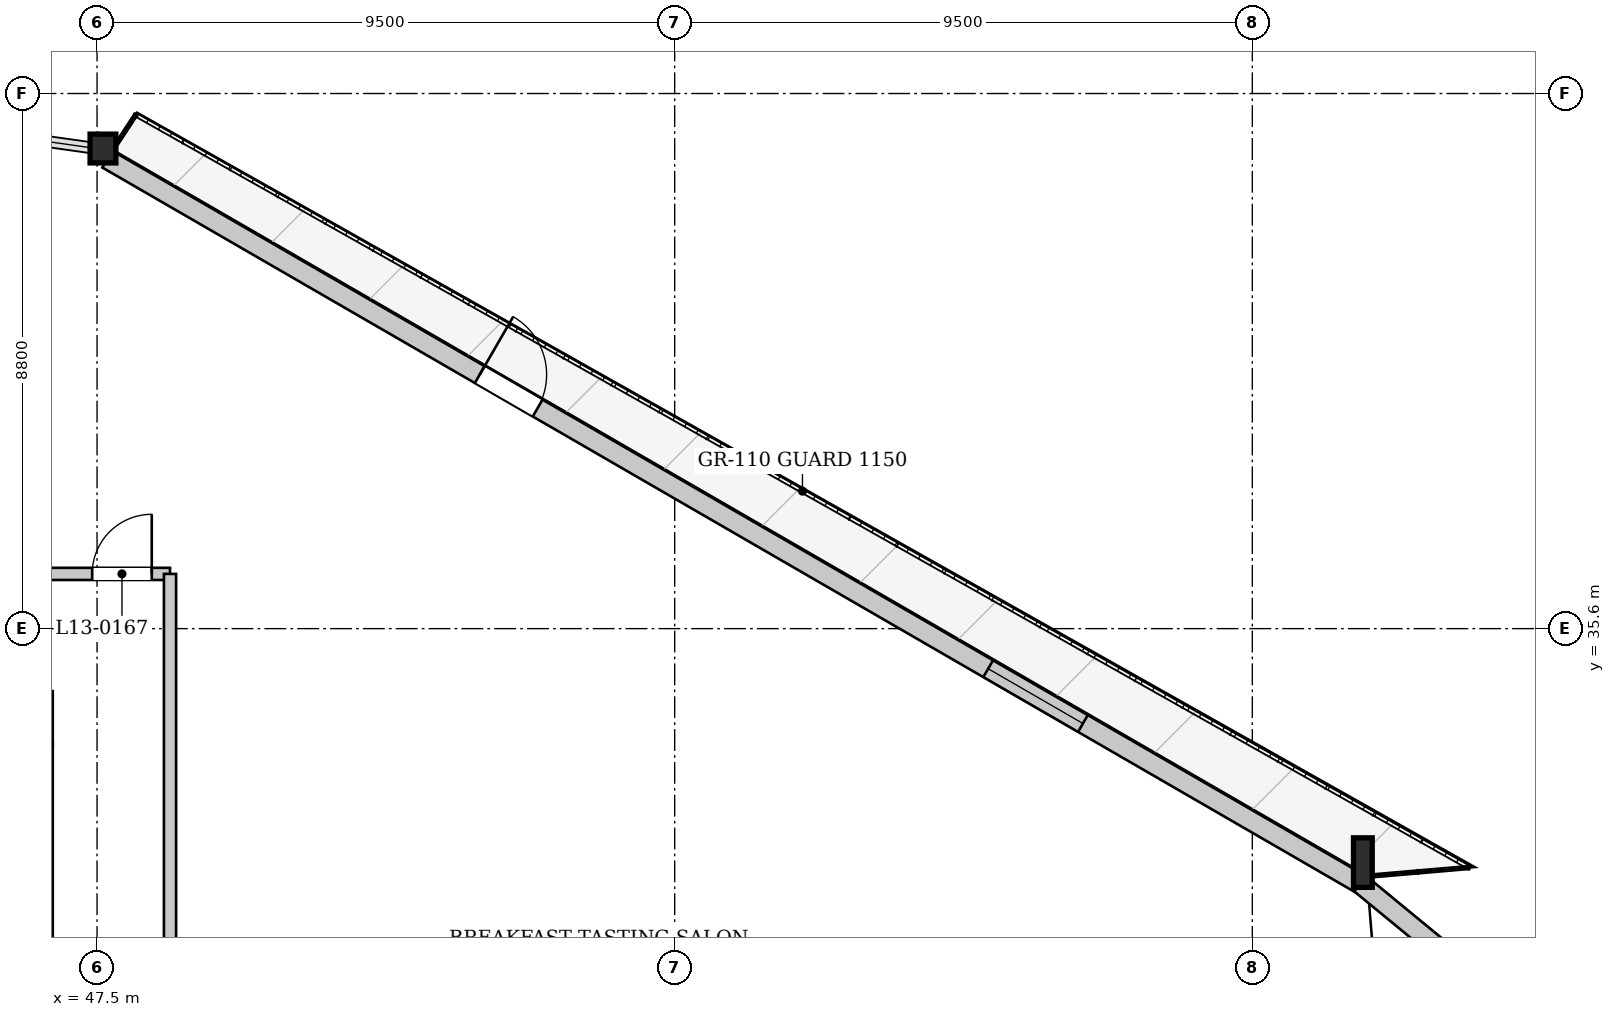
"""IFC4 building model, lengths in metres.
Left out: names, types, materials, properties, quantities, classifications, styles, units other than length and angle.
Written with IfcOpenShell. Run it as: python <this file> out.ifc"""

import sys

from ifc_helpers import new_model, si_unit, direction, frame, frame_2d, origin, origin_2d, place, context, subcontext, project, spatial, rectangle, i_section, extrude, source, transform, mapped, element, fill, save


model = new_model("IFC4")
c1 = context("Model", 3, precision=1e-05, world=origin(), true_north=direction((0.0, 1.0)))
c2 = subcontext(c1, "Body", "Model", "MODEL_VIEW")
j1 = project(units=[si_unit("LENGTHUNIT", "METRE"), si_unit("PLANEANGLEUNIT", "RADIAN")], contexts=[c1])
p1 = place(None, origin())
s1 = spatial("IfcSite", under=j1, at=p1, CompositionType="ELEMENT")
p2 = place(p1, origin())
s2 = spatial("IfcBuilding", under=s1, at=p2, CompositionType="ELEMENT")
p3 = place(p2, frame((0.0, 0.0, 54.15)))
s3 = spatial("IfcBuildingStorey", under=s2, at=p3, CompositionType="ELEMENT", Elevation=54.15)
m1 = source(origin(), c2, "Body", "SweptSolid", [
    extrude(i_section(OverallWidth=0.308, OverallDepth=0.814, WebThickness=0.021, FlangeThickness=0.04, at=origin_2d()), origin(), (0.0, 0.0, 1.0), 3.417),
])
p4 = place(p3, frame((68.38, 31.526, 0.0), z_axis=(-0.036077478038, 0.132522221309, 0.990523233669), x_axis=(-0.964883756144, -0.262677248977, 0.0)))
e1 = element("IfcColumn", 1, at=p4, inside=s3, PredefinedType="COLUMN", context=c2, shape_type="MappedRepresentation", body=[
    mapped(m1, transform((0.0, 0.0, 0.0), x_axis=(1.0, 0.0, 0.0), y_axis=(0.0, 1.0, 0.0), z_axis=(0.0, 0.0, 1.0), scale=1.0)),
])
m2 = source(origin(), c2, "Body", "SweptSolid", [
    extrude(i_section(OverallWidth=0.424, OverallDepth=0.474, WebThickness=0.043, FlangeThickness=0.068, at=origin_2d()), origin(), (0.0, 0.0, 1.0), 3.399),
])
p5 = place(p3, frame((47.748, 43.459, 0.0), z_axis=(-0.088630763536, 0.021188067458, 0.995839170525), x_axis=(-0.232508383837, -0.972594392049, 0.0)))
e2 = element("IfcColumn", 2, at=p5, inside=s3, PredefinedType="COLUMN", context=c2, shape_type="MappedRepresentation", body=[
    mapped(m2, transform((0.0, 0.0, 0.0), x_axis=(1.0, 0.0, 0.0), y_axis=(0.0, 1.0, 0.0), z_axis=(0.0, 0.0, 1.0), scale=1.0)),
])
p6 = place(p3, frame((47.668, 43.321, 0.0), z_axis=(0.0, 0.0, 1.0), x_axis=(0.865638001519, -0.500670400888, 0.0)))
e3 = element("IfcWall", 3, at=p6, inside=s3, PredefinedType="SOLIDWALL", context=c2, shape_type="SweptSolid", body=[
    extrude(rectangle(XDim=23.834, YDim=0.32, at=frame_2d((11.917, 0.0))), origin(), (0.0, 0.0, 1.0), 2.592),
])
p7 = place(p6, frame((7.077, 0.0, 0.0)))
e4 = element("IfcOpeningElement", 4, at=p7, cuts=e3, PredefinedType="OPENING", context=c2, shape_type="SweptSolid", body=[
    extrude(rectangle(XDim=1.1, YDim=2.3, at=frame_2d((0.55, 1.15))), frame((0.0, 0.17, 0.0), z_axis=(0.0, -1.0, 0.0), x_axis=(1.0, 0.0, 0.0)), (0.0, 0.0, 1.0), 0.34),
])
p8 = place(p6, frame((16.737, 0.0, 0.272)))
e5 = element("IfcOpeningElement", 5, at=p8, cuts=e3, PredefinedType="OPENING", context=c2, shape_type="SweptSolid", body=[
    extrude(rectangle(XDim=1.8, YDim=2.2, at=frame_2d((0.9, 1.1))), frame((0.0, 0.17, 0.0), z_axis=(0.0, -1.0, 0.0), x_axis=(1.0, 0.0, 0.0)), (0.0, 0.0, 1.0), 0.34),
])
p9 = place(p3, frame((68.278, 31.403, 0.0), z_axis=(0.0, 0.0, 1.0), x_axis=(0.772169227006, -0.635416937817, 0.0)))
e6 = element("IfcWall", 6, at=p9, inside=s3, PredefinedType="SOLIDWALL", context=c2, shape_type="SweptSolid", body=[
    extrude(rectangle(XDim=3.272, YDim=0.32, at=frame_2d((1.636, 0.0))), origin(), (0.0, 0.0, 1.0), 2.592),
])
p10 = place(p3, frame((27.3, 36.5, 0.0), z_axis=(0.0, 0.0, 1.0), x_axis=(1.0, 0.0, 0.0)))
e7 = element("IfcWall", 7, at=p10, inside=s3, PredefinedType="PARTITIONING", context=c2, shape_type="SweptSolid", body=[
    extrude(rectangle(XDim=21.4, YDim=0.2, at=frame_2d((10.7, 0.0))), origin(), (0.0, 0.0, 1.0), 3.3),
])
p11 = place(p10, frame((20.12, 0.0, 0.0)))
e8 = element("IfcOpeningElement", 8, at=p11, cuts=e7, PredefinedType="OPENING", context=c2, shape_type="SweptSolid", body=[
    extrude(rectangle(XDim=0.98, YDim=2.15, at=frame_2d((0.49, 1.075))), frame((0.0, 0.11, 0.0), z_axis=(0.0, -1.0, 0.0), x_axis=(1.0, 0.0, 0.0)), (0.0, 0.0, 1.0), 0.22),
])
p12 = place(p3, frame((48.7, 16.7, 0.0), z_axis=(0.0, 0.0, 1.0), x_axis=(0.0, 1.0, 0.0)))
e9 = element("IfcWall", 9, at=p12, inside=s3, PredefinedType="PARTITIONING", context=c2, shape_type="SweptSolid", body=[
    extrude(rectangle(XDim=19.8, YDim=0.2, at=frame_2d((9.9, 0.0))), origin(), (0.0, 0.0, 1.0), 3.3),
])
p13 = place(p12, frame((1.342, 0.0, 0.0)))
e10 = element("IfcOpeningElement", 10, at=p13, cuts=e9, PredefinedType="OPENING", context=c2, shape_type="SweptSolid", body=[
    extrude(rectangle(XDim=0.98, YDim=2.15, at=frame_2d((0.49, 1.075))), frame((0.0, 0.11, 0.0), z_axis=(0.0, -1.0, 0.0), x_axis=(1.0, 0.0, 0.0)), (0.0, 0.0, 1.0), 0.22),
])
m3 = source(origin(), c2, "Body", "SweptSolid", [
    extrude(rectangle(XDim=1.1, YDim=2.3, at=frame_2d((0.55, 1.15))), frame((0.0, 0.025, 0.0), z_axis=(0.0, -1.0, 0.0), x_axis=(1.0, 0.0, 0.0)), (0.0, 0.0, 1.0), 0.05),
])
p14 = place(p7, origin())
e11 = element("IfcDoor", 11, at=p14, inside=s3, OperationType="SINGLE_SWING_LEFT", PredefinedType="DOOR", context=c2, shape_type="MappedRepresentation", body=[
    mapped(m3, transform((0.0, 0.0, 0.0), x_axis=(1.0, 0.0, 0.0), y_axis=(0.0, 1.0, 0.0), z_axis=(0.0, 0.0, 1.0), scale=1.0)),
])
fill(e4, e11)
m4 = source(origin(), c2, "Body", "SweptSolid", [
    extrude(rectangle(XDim=1.8, YDim=2.2, at=frame_2d((0.9, 1.1))), frame((0.0, 0.03, 0.0), z_axis=(0.0, -1.0, 0.0), x_axis=(1.0, 0.0, 0.0)), (0.0, 0.0, 1.0), 0.06),
])
p15 = place(p8, origin())
e12 = element("IfcWindow", 12, at=p15, inside=s3, PartitioningType="SINGLE_PANEL", PredefinedType="WINDOW", context=c2, shape_type="MappedRepresentation", body=[
    mapped(m4, transform((0.0, 0.0, 0.0), x_axis=(1.0, 0.0, 0.0), y_axis=(0.0, 1.0, 0.0), z_axis=(0.0, 0.0, 1.0), scale=1.0)),
])
fill(e5, e12)
m5 = source(origin(), c2, "Body", "SweptSolid", [
    extrude(rectangle(XDim=0.98, YDim=2.15, at=frame_2d((0.49, 1.075))), frame((0.0, 0.025, 0.0), z_axis=(0.0, -1.0, 0.0), x_axis=(1.0, 0.0, 0.0)), (0.0, 0.0, 1.0), 0.05),
])
p16 = place(p11, origin())
e13 = element("IfcDoor", 13, at=p16, inside=s3, OperationType="SINGLE_SWING_RIGHT", PredefinedType="DOOR", context=c2, shape_type="MappedRepresentation", body=[
    mapped(m5, transform((0.0, 0.0, 0.0), x_axis=(1.0, 0.0, 0.0), y_axis=(0.0, 1.0, 0.0), z_axis=(0.0, 0.0, 1.0), scale=1.0)),
])
fill(e8, e13)
save(model, sys.argv[1])
